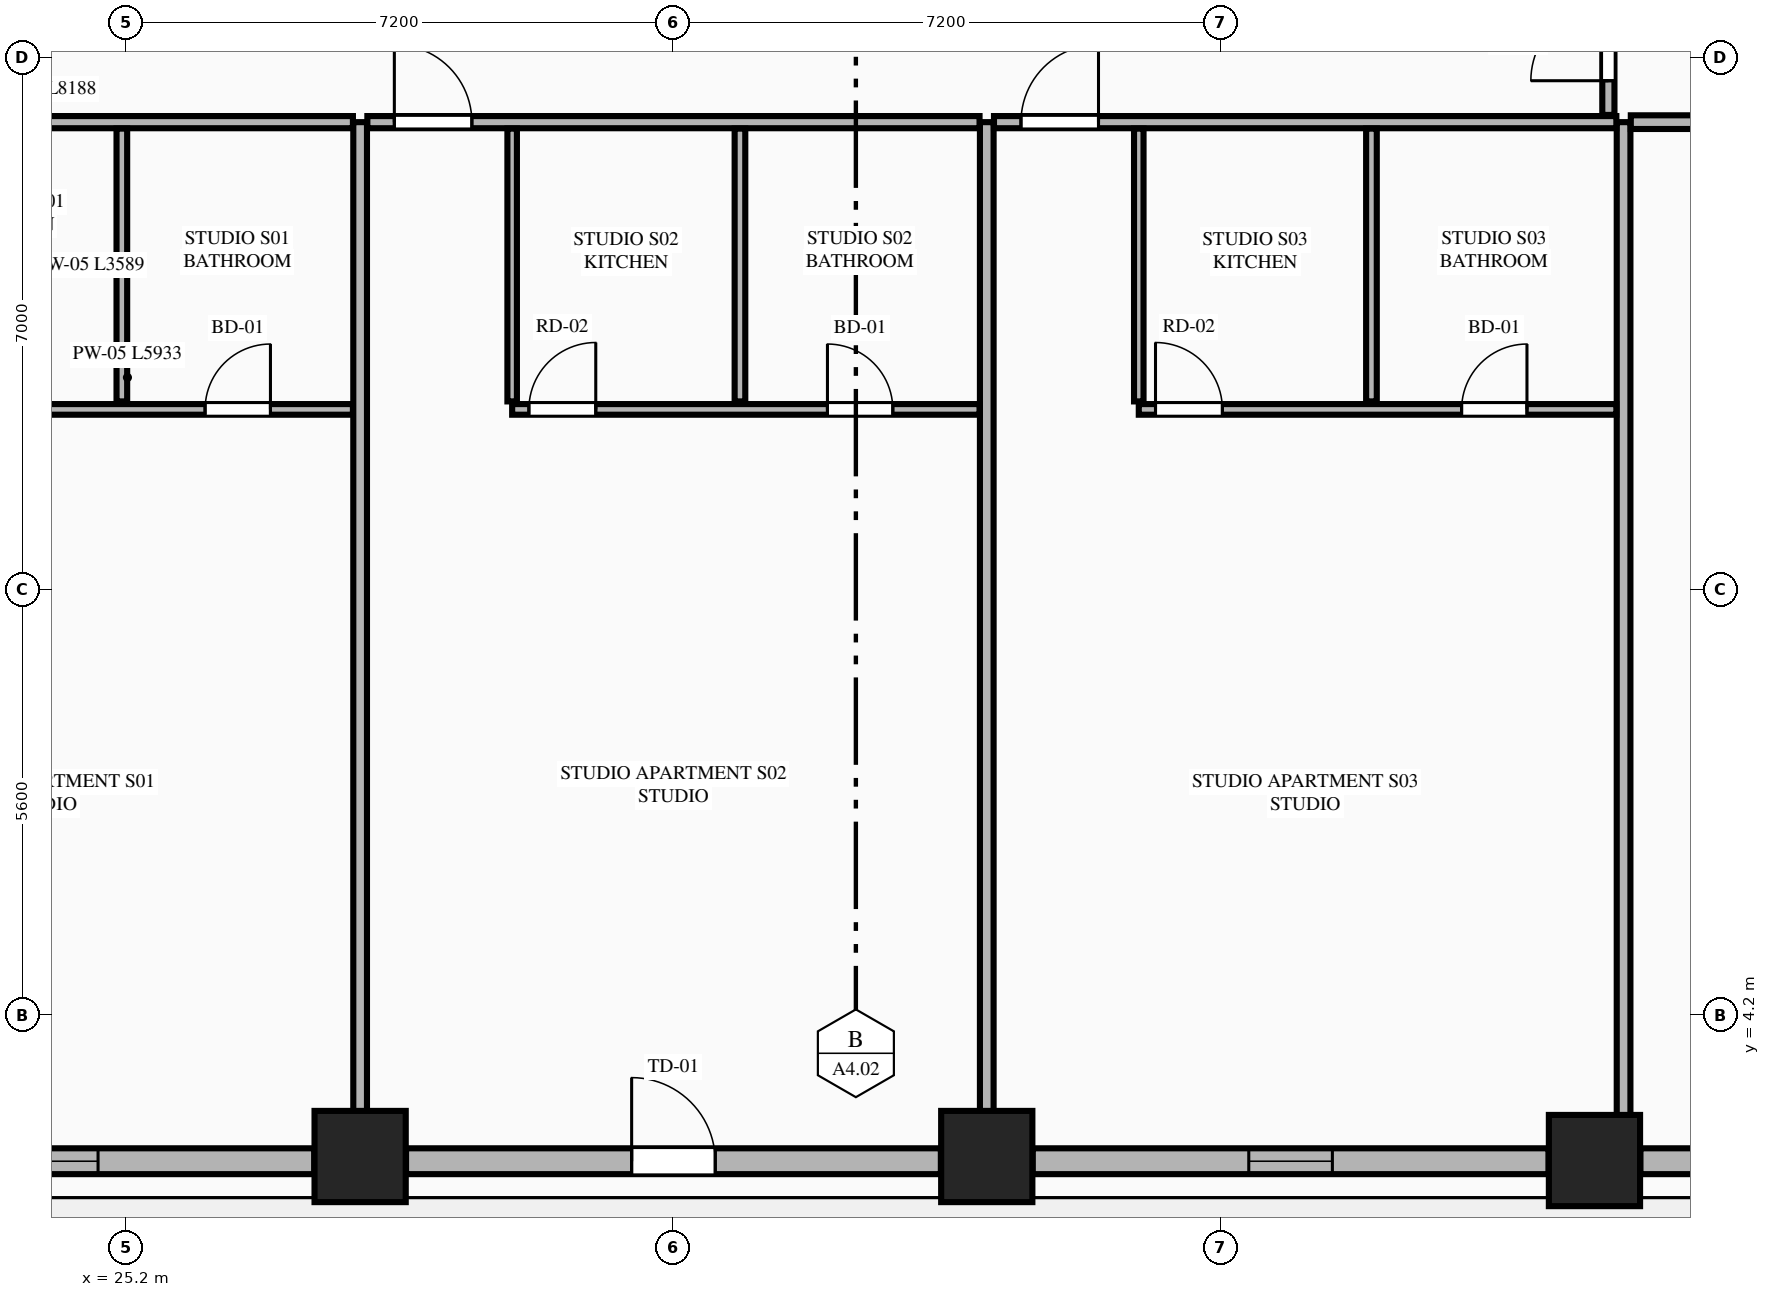
"""IFC4 building model, lengths in metres.
Left out: names, types, materials, properties, quantities, classifications, styles, units other than length and angle.
Written with IfcOpenShell. Run it as: python <this file> out.ifc"""

import sys

from ifc_helpers import new_model, si_unit, direction, frame, frame_2d, origin, origin_2d, place, context, subcontext, project, spatial, rectangle, extrude, element, fill, save


model = new_model("IFC4")
c1 = context("Model", 3, precision=1e-05, world=origin(), true_north=direction((0.0, 1.0)))
c2 = subcontext(c1, "Body", "Model", "MODEL_VIEW")
j1 = project(units=[si_unit("LENGTHUNIT", "METRE"), si_unit("PLANEANGLEUNIT", "RADIAN")], contexts=[c1])
p1 = place(None, origin())
s1 = spatial("IfcSite", under=j1, at=p1, CompositionType="ELEMENT")
p2 = place(p1, origin())
s2 = spatial("IfcBuilding", under=s1, at=p2, CompositionType="ELEMENT")
p3 = place(p2, frame((0.0, 0.0, 63.95)))
s3 = spatial("IfcBuildingStorey", under=s2, at=p3, CompositionType="ELEMENT", Elevation=63.95)
for number, where, z_axis, x_axis in (
    (1, (28.278, 2.342, 0.0), (0.0, 0.0, 1.0), (1.0, 0.0, 0.0)),
    (2, (36.522, 2.342, 0.0), (0.0, 0.0, 1.0), (1.0, 0.0, 0.0)),
    (3, (44.517, 2.289, 0.0), (0.0, 0.0, 1.0), (1.0, 0.0, 0.0)),
):
    element("IfcColumn", number, at=place(p3, frame(where, z_axis=z_axis, x_axis=x_axis)), inside=s3, PredefinedType="COLUMN", context=c2, shape_type="SweptSolid", body=[
        extrude(rectangle(XDim=1.2, YDim=1.2, at=origin_2d()), origin(), (0.0, 0.0, 1.0), 3.55),
    ])
p4 = place(p3, frame((20.887, 2.28, 0.0), z_axis=(0.0, 0.0, 1.0), x_axis=(1.0, 0.0, 0.0)))
e4 = element("IfcWall", 4, at=p4, inside=s3, PredefinedType="STANDARD", context=c2, shape_type="SweptSolid", body=[
    extrude(rectangle(XDim=6.787, YDim=0.34, at=frame_2d((3.394, 0.0))), origin(), (0.0, 0.0, 1.0), 2.787),
])
p5 = place(p4, frame((2.843, 0.0, 0.75)))
e5 = element("IfcOpeningElement", 5, at=p5, cuts=e4, PredefinedType="OPENING", context=c2, shape_type="SweptSolid", body=[
    extrude(rectangle(XDim=1.1, YDim=1.887, at=frame_2d((0.55, 0.943))), frame((0.0, 0.18, 0.0), z_axis=(0.0, -1.0, 0.0), x_axis=(1.0, 0.0, 0.0)), (0.0, 0.0, 1.0), 0.36),
])
p6 = place(p3, frame((28.882, 2.28, 0.0), z_axis=(0.0, 0.0, 1.0), x_axis=(1.0, 0.0, 0.0)))
e6 = element("IfcWall", 6, at=p6, inside=s3, PredefinedType="STANDARD", context=c2, shape_type="SweptSolid", body=[
    extrude(rectangle(XDim=7.036, YDim=0.34, at=frame_2d((3.518, 0.0))), origin(), (0.0, 0.0, 1.0), 2.787),
])
p7 = place(p6, frame((2.968, 0.0, 0.0)))
e7 = element("IfcOpeningElement", 7, at=p7, cuts=e6, PredefinedType="OPENING", context=c2, shape_type="SweptSolid", body=[
    extrude(rectangle(XDim=1.1, YDim=2.25, at=frame_2d((0.55, 1.125))), frame((0.0, 0.18, 0.0), z_axis=(0.0, -1.0, 0.0), x_axis=(1.0, 0.0, 0.0)), (0.0, 0.0, 1.0), 0.36),
])
p8 = place(p3, frame((37.126, 2.28, 0.0), z_axis=(0.0, 0.0, 1.0), x_axis=(1.0, 0.0, 0.0)))
e8 = element("IfcWall", 8, at=p8, inside=s3, PredefinedType="STANDARD", context=c2, shape_type="SweptSolid", body=[
    extrude(rectangle(XDim=6.787, YDim=0.34, at=frame_2d((3.394, 0.0))), origin(), (0.0, 0.0, 1.0), 2.787),
])
p9 = place(p8, frame((2.843, 0.0, 0.75)))
e9 = element("IfcOpeningElement", 9, at=p9, cuts=e8, PredefinedType="OPENING", context=c2, shape_type="SweptSolid", body=[
    extrude(rectangle(XDim=1.1, YDim=1.887, at=frame_2d((0.55, 0.943))), frame((0.0, 0.18, 0.0), z_axis=(0.0, -1.0, 0.0), x_axis=(1.0, 0.0, 0.0)), (0.0, 0.0, 1.0), 0.36),
])
p10 = place(p3, frame((45.121, 2.28, 0.0), z_axis=(0.0, 0.0, 1.0), x_axis=(1.0, 0.0, 0.0)))
e10 = element("IfcWall", 10, at=p10, inside=s3, PredefinedType="STANDARD", context=c2, shape_type="SweptSolid", body=[
    extrude(rectangle(XDim=1.245, YDim=0.34, at=frame_2d((0.623, 0.0))), origin(), (0.0, 0.0, 1.0), 3.33),
])
for number, where, z_axis, x_axis in (
    (11, (28.278, 2.455, 0.0), (0.0, 0.0, 1.0), (0.0, 1.0, 0.0)),
    (12, (36.522, 2.455, 0.0), (0.0, 0.0, 1.0), (0.0, 1.0, 0.0)),
):
    element("IfcWall", number, at=place(p3, frame(where, z_axis=z_axis, x_axis=x_axis)), inside=s3, PredefinedType="PARTITIONING", context=c2, shape_type="SweptSolid", body=[
        extrude(rectangle(XDim=13.495, YDim=0.18, at=frame_2d((6.748, 0.0))), origin(), (0.0, 0.0, 1.0), 2.7),
    ])
p11 = place(p3, frame((44.9, 2.455, 0.0), z_axis=(0.0, 0.0, 1.0), x_axis=(0.0, 1.0, 0.0)))
e13 = element("IfcWall", 13, at=p11, inside=s3, PredefinedType="PARTITIONING", context=c2, shape_type="SweptSolid", body=[
    extrude(rectangle(XDim=13.495, YDim=0.18, at=frame_2d((6.748, 0.0))), origin(), (0.0, 0.0, 1.0), 3.33),
])
p12 = place(p3, frame((19.995, 15.95, 0.0), z_axis=(0.0, 0.0, 1.0), x_axis=(1.0, 0.0, 0.0)))
e14 = element("IfcWall", 14, at=p12, inside=s3, PredefinedType="PARTITIONING", context=c2, shape_type="SweptSolid", body=[
    extrude(rectangle(XDim=8.188, YDim=0.16, at=frame_2d((4.094, 0.0))), origin(), (0.0, 0.0, 1.0), 3.33),
])
p13 = place(p12, frame((0.705, 0.0, 0.0)))
e15 = element("IfcOpeningElement", 15, at=p13, cuts=e14, PredefinedType="OPENING", context=c2, shape_type="SweptSolid", body=[
    extrude(rectangle(XDim=1.02, YDim=2.25, at=frame_2d((0.51, 1.125))), frame((0.0, 0.09, 0.0), z_axis=(0.0, -1.0, 0.0), x_axis=(1.0, 0.0, 0.0)), (0.0, 0.0, 1.0), 0.18),
])
p14 = place(p3, frame((22.25, 12.171, 0.0), z_axis=(0.0, 0.0, 1.0), x_axis=(1.0, 0.0, 0.0)))
e16 = element("IfcWall", 16, at=p14, inside=s3, PredefinedType="PLUMBINGWALL", context=c2, shape_type="SweptSolid", body=[
    extrude(rectangle(XDim=5.933, YDim=0.14, at=frame_2d((2.967, 0.0))), origin(), (0.0, 0.0, 1.0), 3.33),
])
p15 = place(p14, frame((3.988, 0.0, 0.0)))
e17 = element("IfcOpeningElement", 17, at=p15, cuts=e16, PredefinedType="OPENING", context=c2, shape_type="SweptSolid", body=[
    extrude(rectangle(XDim=0.86, YDim=2.1, at=frame_2d((0.43, 1.05))), frame((0.0, 0.08, 0.0), z_axis=(0.0, -1.0, 0.0), x_axis=(1.0, 0.0, 0.0)), (0.0, 0.0, 1.0), 0.16),
])
p16 = place(p14, frame((0.22, 0.0, 0.0)))
e18 = element("IfcOpeningElement", 18, at=p16, cuts=e16, PredefinedType="OPENING", context=c2, shape_type="SweptSolid", body=[
    extrude(rectangle(XDim=0.88, YDim=2.15, at=frame_2d((0.44, 1.075))), frame((0.0, 0.08, 0.0), z_axis=(0.0, -1.0, 0.0), x_axis=(1.0, 0.0, 0.0)), (0.0, 0.0, 1.0), 0.16),
])
p17 = place(p3, frame((25.143, 12.276, 0.0), z_axis=(0.0, 0.0, 1.0), x_axis=(0.0, 1.0, 0.0)))
e19 = element("IfcWall", 19, at=p17, inside=s3, PredefinedType="PLUMBINGWALL", context=c2, shape_type="SweptSolid", body=[
    extrude(rectangle(XDim=3.589, YDim=0.14, at=frame_2d((1.794, 0.0))), origin(), (0.0, 0.0, 1.0), 3.33),
])
p18 = place(p3, frame((28.373, 15.95, 0.0), z_axis=(0.0, 0.0, 1.0), x_axis=(1.0, 0.0, 0.0)))
e20 = element("IfcWall", 20, at=p18, inside=s3, PredefinedType="PARTITIONING", context=c2, shape_type="SweptSolid", body=[
    extrude(rectangle(XDim=8.054, YDim=0.16, at=frame_2d((4.027, 0.0))), origin(), (0.0, 0.0, 1.0), 3.33),
])
p19 = place(p18, frame((0.355, 0.0, 0.0)))
e21 = element("IfcOpeningElement", 21, at=p19, cuts=e20, PredefinedType="OPENING", context=c2, shape_type="SweptSolid", body=[
    extrude(rectangle(XDim=1.02, YDim=2.25, at=frame_2d((0.51, 1.125))), frame((0.0, 0.09, 0.0), z_axis=(0.0, -1.0, 0.0), x_axis=(1.0, 0.0, 0.0)), (0.0, 0.0, 1.0), 0.18),
])
p20 = place(p3, frame((30.278, 12.276, 0.0), z_axis=(0.0, 0.0, 1.0), x_axis=(0.0, 1.0, 0.0)))
e22 = element("IfcWall", 22, at=p20, inside=s3, PredefinedType="PARTITIONING", context=c2, shape_type="SweptSolid", body=[
    extrude(rectangle(XDim=3.589, YDim=0.125, at=frame_2d((1.794, 0.0))), origin(), (0.0, 0.0, 1.0), 3.33),
])
p21 = place(p3, frame((30.278, 12.171, 0.0), z_axis=(0.0, 0.0, 1.0), x_axis=(1.0, 0.0, 0.0)))
e23 = element("IfcWall", 23, at=p21, inside=s3, PredefinedType="PLUMBINGWALL", context=c2, shape_type="SweptSolid", body=[
    extrude(rectangle(XDim=6.149, YDim=0.14, at=frame_2d((3.074, 0.0))), origin(), (0.0, 0.0, 1.0), 3.33),
])
p22 = place(p21, frame((4.148, 0.0, 0.0)))
e24 = element("IfcOpeningElement", 24, at=p22, cuts=e23, PredefinedType="OPENING", context=c2, shape_type="SweptSolid", body=[
    extrude(rectangle(XDim=0.86, YDim=2.1, at=frame_2d((0.43, 1.05))), frame((0.0, 0.08, 0.0), z_axis=(0.0, -1.0, 0.0), x_axis=(1.0, 0.0, 0.0)), (0.0, 0.0, 1.0), 0.16),
])
p23 = place(p21, frame((0.22, 0.0, 0.0)))
e25 = element("IfcOpeningElement", 25, at=p23, cuts=e23, PredefinedType="OPENING", context=c2, shape_type="SweptSolid", body=[
    extrude(rectangle(XDim=0.88, YDim=2.15, at=frame_2d((0.44, 1.075))), frame((0.0, 0.08, 0.0), z_axis=(0.0, -1.0, 0.0), x_axis=(1.0, 0.0, 0.0)), (0.0, 0.0, 1.0), 0.16),
])
p24 = place(p3, frame((33.275, 12.276, 0.0), z_axis=(0.0, 0.0, 1.0), x_axis=(0.0, 1.0, 0.0)))
e26 = element("IfcWall", 26, at=p24, inside=s3, PredefinedType="PLUMBINGWALL", context=c2, shape_type="SweptSolid", body=[
    extrude(rectangle(XDim=3.589, YDim=0.14, at=frame_2d((1.794, 0.0))), origin(), (0.0, 0.0, 1.0), 3.33),
])
p25 = place(p3, frame((36.617, 15.95, 0.0), z_axis=(0.0, 0.0, 1.0), x_axis=(1.0, 0.0, 0.0)))
e27 = element("IfcWall", 27, at=p25, inside=s3, PredefinedType="PARTITIONING", context=c2, shape_type="SweptSolid", body=[
    extrude(rectangle(XDim=8.188, YDim=0.16, at=frame_2d((4.094, 0.0))), origin(), (0.0, 0.0, 1.0), 3.33),
])
p26 = place(p25, frame((0.355, 0.0, 0.0)))
e28 = element("IfcOpeningElement", 28, at=p26, cuts=e27, PredefinedType="OPENING", context=c2, shape_type="SweptSolid", body=[
    extrude(rectangle(XDim=1.02, YDim=2.25, at=frame_2d((0.51, 1.125))), frame((0.0, 0.09, 0.0), z_axis=(0.0, -1.0, 0.0), x_axis=(1.0, 0.0, 0.0)), (0.0, 0.0, 1.0), 0.18),
])
p27 = place(p3, frame((38.522, 12.276, 0.0), z_axis=(0.0, 0.0, 1.0), x_axis=(0.0, 1.0, 0.0)))
e29 = element("IfcWall", 29, at=p27, inside=s3, PredefinedType="PARTITIONING", context=c2, shape_type="SweptSolid", body=[
    extrude(rectangle(XDim=3.589, YDim=0.125, at=frame_2d((1.794, 0.0))), origin(), (0.0, 0.0, 1.0), 3.33),
])
p28 = place(p3, frame((38.522, 12.171, 0.0), z_axis=(0.0, 0.0, 1.0), x_axis=(1.0, 0.0, 0.0)))
e30 = element("IfcWall", 30, at=p28, inside=s3, PredefinedType="PLUMBINGWALL", context=c2, shape_type="SweptSolid", body=[
    extrude(rectangle(XDim=6.283, YDim=0.14, at=frame_2d((3.142, 0.0))), origin(), (0.0, 0.0, 1.0), 3.33),
])
p29 = place(p28, frame((4.247, 0.0, 0.0)))
e31 = element("IfcOpeningElement", 31, at=p29, cuts=e30, PredefinedType="OPENING", context=c2, shape_type="SweptSolid", body=[
    extrude(rectangle(XDim=0.86, YDim=2.1, at=frame_2d((0.43, 1.05))), frame((0.0, 0.08, 0.0), z_axis=(0.0, -1.0, 0.0), x_axis=(1.0, 0.0, 0.0)), (0.0, 0.0, 1.0), 0.16),
])
p30 = place(p28, frame((0.22, 0.0, 0.0)))
e32 = element("IfcOpeningElement", 32, at=p30, cuts=e30, PredefinedType="OPENING", context=c2, shape_type="SweptSolid", body=[
    extrude(rectangle(XDim=0.88, YDim=2.15, at=frame_2d((0.44, 1.075))), frame((0.0, 0.08, 0.0), z_axis=(0.0, -1.0, 0.0), x_axis=(1.0, 0.0, 0.0)), (0.0, 0.0, 1.0), 0.16),
])
p31 = place(p3, frame((41.583, 12.276, 0.0), z_axis=(0.0, 0.0, 1.0), x_axis=(0.0, 1.0, 0.0)))
e33 = element("IfcWall", 33, at=p31, inside=s3, PredefinedType="PLUMBINGWALL", context=c2, shape_type="SweptSolid", body=[
    extrude(rectangle(XDim=3.589, YDim=0.14, at=frame_2d((1.794, 0.0))), origin(), (0.0, 0.0, 1.0), 3.33),
])
p32 = place(p3, frame((44.995, 15.95, 0.0), z_axis=(0.0, 0.0, 1.0), x_axis=(1.0, 0.0, 0.0)))
e34 = element("IfcWall", 34, at=p32, inside=s3, PredefinedType="PARTITIONING", context=c2, shape_type="SweptSolid", body=[
    extrude(rectangle(XDim=9.241, YDim=0.18, at=frame_2d((4.621, 0.0))), origin(), (0.0, 0.0, 1.0), 3.33),
])
p33 = place(p3, frame((44.7, 16.045, 0.0), z_axis=(0.0, 0.0, 1.0), x_axis=(0.0, 1.0, 0.0)))
e35 = element("IfcWall", 35, at=p33, inside=s3, PredefinedType="PARTITIONING", context=c2, shape_type="SweptSolid", body=[
    extrude(rectangle(XDim=19.71, YDim=0.16, at=frame_2d((9.855, 0.0))), origin(), (0.0, 0.0, 1.0), 2.7),
])
p34 = place(p33, frame((0.45, 0.0, 0.0)))
e36 = element("IfcOpeningElement", 36, at=p34, cuts=e35, PredefinedType="OPENING", context=c2, shape_type="SweptSolid", body=[
    extrude(rectangle(XDim=1.02, YDim=2.25, at=frame_2d((0.51, 1.125))), frame((0.0, 0.09, 0.0), z_axis=(0.0, -1.0, 0.0), x_axis=(1.0, 0.0, 0.0)), (0.0, 0.0, 1.0), 0.18),
])
p35 = place(p5, origin())
e37 = element("IfcWindow", 37, at=p35, inside=s3, PartitioningType="SINGLE_PANEL", PredefinedType="WINDOW", context=c2, shape_type="SweptSolid", body=[
    extrude(rectangle(XDim=1.1, YDim=1.887, at=frame_2d((0.55, 0.943))), frame((0.0, 0.03, 0.0), z_axis=(0.0, -1.0, 0.0), x_axis=(1.0, 0.0, 0.0)), (0.0, 0.0, 1.0), 0.06),
])
fill(e5, e37)
p36 = place(p7, origin())
e38 = element("IfcDoor", 38, at=p36, inside=s3, OperationType="SINGLE_SWING_LEFT", PredefinedType="DOOR", context=c2, shape_type="SweptSolid", body=[
    extrude(rectangle(XDim=1.1, YDim=2.25, at=frame_2d((0.55, 1.125))), frame((0.0, 0.025, 0.0), z_axis=(0.0, -1.0, 0.0), x_axis=(1.0, 0.0, 0.0)), (0.0, 0.0, 1.0), 0.05),
])
fill(e7, e38)
p37 = place(p9, origin())
e39 = element("IfcWindow", 39, at=p37, inside=s3, PartitioningType="SINGLE_PANEL", PredefinedType="WINDOW", context=c2, shape_type="SweptSolid", body=[
    extrude(rectangle(XDim=1.1, YDim=1.887, at=frame_2d((0.55, 0.943))), frame((0.0, 0.03, 0.0), z_axis=(0.0, -1.0, 0.0), x_axis=(1.0, 0.0, 0.0)), (0.0, 0.0, 1.0), 0.06),
])
fill(e9, e39)
p38 = place(p15, origin())
e40 = element("IfcDoor", 40, at=p38, inside=s3, OperationType="SINGLE_SWING_RIGHT", PredefinedType="DOOR", context=c2, shape_type="SweptSolid", body=[
    extrude(rectangle(XDim=0.86, YDim=2.1, at=frame_2d((0.43, 1.05))), frame((0.0, 0.025, 0.0), z_axis=(0.0, -1.0, 0.0), x_axis=(1.0, 0.0, 0.0)), (0.0, 0.0, 1.0), 0.05),
])
fill(e17, e40)
p39 = place(p22, origin())
e41 = element("IfcDoor", 41, at=p39, inside=s3, OperationType="SINGLE_SWING_LEFT", PredefinedType="DOOR", context=c2, shape_type="SweptSolid", body=[
    extrude(rectangle(XDim=0.86, YDim=2.1, at=frame_2d((0.43, 1.05))), frame((0.0, 0.025, 0.0), z_axis=(0.0, -1.0, 0.0), x_axis=(1.0, 0.0, 0.0)), (0.0, 0.0, 1.0), 0.05),
])
fill(e24, e41)
p40 = place(p19, origin())
e42 = element("IfcDoor", 42, at=p40, inside=s3, OperationType="SINGLE_SWING_LEFT", PredefinedType="DOOR", context=c2, shape_type="SweptSolid", body=[
    extrude(rectangle(XDim=1.02, YDim=2.25, at=frame_2d((0.51, 1.125))), frame((0.0, 0.025, 0.0), z_axis=(0.0, -1.0, 0.0), x_axis=(1.0, 0.0, 0.0)), (0.0, 0.0, 1.0), 0.05),
])
fill(e21, e42)
p41 = place(p23, origin())
e43 = element("IfcDoor", 43, at=p41, inside=s3, OperationType="SINGLE_SWING_RIGHT", PredefinedType="DOOR", context=c2, shape_type="SweptSolid", body=[
    extrude(rectangle(XDim=0.88, YDim=2.15, at=frame_2d((0.44, 1.075))), frame((0.0, 0.025, 0.0), z_axis=(0.0, -1.0, 0.0), x_axis=(1.0, 0.0, 0.0)), (0.0, 0.0, 1.0), 0.05),
])
fill(e25, e43)
p42 = place(p29, origin())
e44 = element("IfcDoor", 44, at=p42, inside=s3, OperationType="SINGLE_SWING_RIGHT", PredefinedType="DOOR", context=c2, shape_type="SweptSolid", body=[
    extrude(rectangle(XDim=0.86, YDim=2.1, at=frame_2d((0.43, 1.05))), frame((0.0, 0.025, 0.0), z_axis=(0.0, -1.0, 0.0), x_axis=(1.0, 0.0, 0.0)), (0.0, 0.0, 1.0), 0.05),
])
fill(e31, e44)
p43 = place(p26, origin())
e45 = element("IfcDoor", 45, at=p43, inside=s3, OperationType="SINGLE_SWING_RIGHT", PredefinedType="DOOR", context=c2, shape_type="SweptSolid", body=[
    extrude(rectangle(XDim=1.02, YDim=2.25, at=frame_2d((0.51, 1.125))), frame((0.0, 0.025, 0.0), z_axis=(0.0, -1.0, 0.0), x_axis=(1.0, 0.0, 0.0)), (0.0, 0.0, 1.0), 0.05),
])
fill(e28, e45)
p44 = place(p30, origin())
e46 = element("IfcDoor", 46, at=p44, inside=s3, OperationType="SINGLE_SWING_LEFT", PredefinedType="DOOR", context=c2, shape_type="SweptSolid", body=[
    extrude(rectangle(XDim=0.88, YDim=2.15, at=frame_2d((0.44, 1.075))), frame((0.0, 0.025, 0.0), z_axis=(0.0, -1.0, 0.0), x_axis=(1.0, 0.0, 0.0)), (0.0, 0.0, 1.0), 0.05),
])
fill(e32, e46)
p45 = place(p34, origin())
e47 = element("IfcDoor", 47, at=p45, inside=s3, OperationType="SINGLE_SWING_LEFT", PredefinedType="DOOR", context=c2, shape_type="SweptSolid", body=[
    extrude(rectangle(XDim=1.02, YDim=2.25, at=frame_2d((0.51, 1.125))), frame((0.0, 0.025, 0.0), z_axis=(0.0, -1.0, 0.0), x_axis=(1.0, 0.0, 0.0)), (0.0, 0.0, 1.0), 0.05),
])
fill(e36, e47)
save(model, sys.argv[1])
